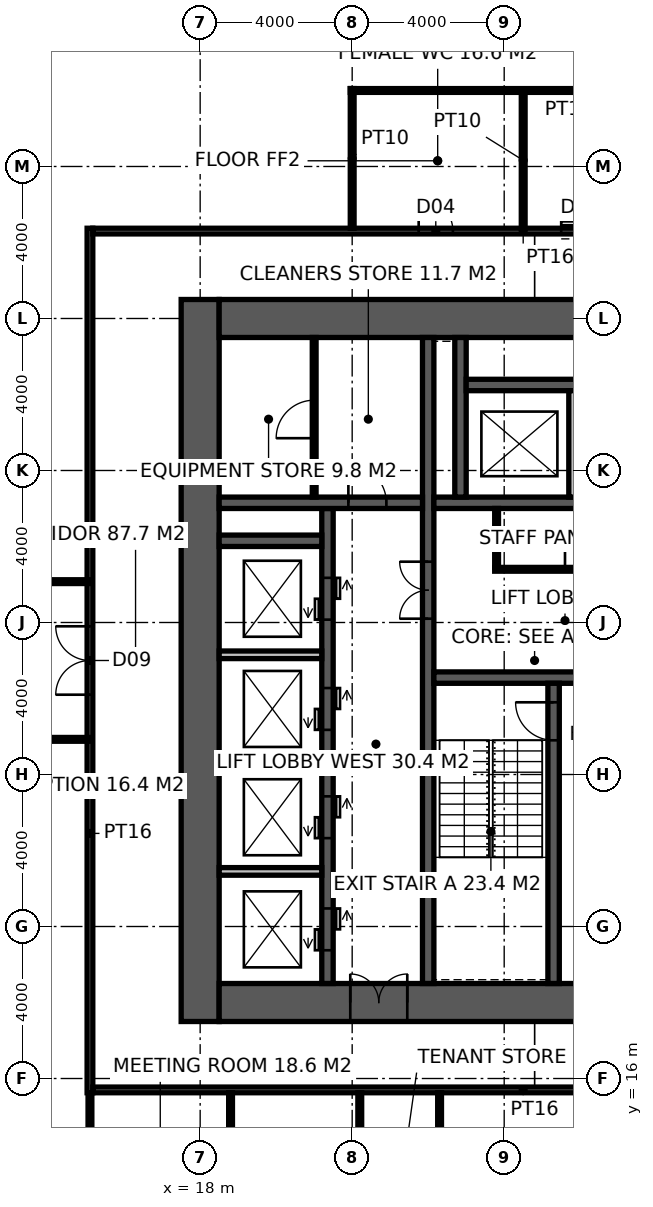
"""IFC4 building model, lengths in metres.
Left out: names, types, materials, properties, quantities, classifications, styles, units other than length and angle.
Written with IfcOpenShell. Run it as: python <this file> out.ifc"""

import sys

from ifc_helpers import new_model, si_unit, direction, frame, frame_2d, origin, place, context, subcontext, project, spatial, rectangle, extrude, element, fill, save


model = new_model("IFC4")
c1 = context("Model", 3, precision=1e-05, world=origin(), true_north=direction((0.0, 1.0)))
c2 = subcontext(c1, "Body", "Model", "MODEL_VIEW")
j1 = project(units=[si_unit("LENGTHUNIT", "METRE"), si_unit("PLANEANGLEUNIT", "RADIAN")], contexts=[c1])
p1 = place(None, origin())
s1 = spatial("IfcSite", under=j1, at=p1, CompositionType="ELEMENT")
p2 = place(p1, origin())
s2 = spatial("IfcBuilding", under=s1, at=p2, CompositionType="ELEMENT")
p3 = place(p2, frame((0.0, 0.0, 133.4)))
s3 = spatial("IfcBuildingStorey", under=s2, at=p3, CompositionType="ELEMENT", Elevation=133.4)
p4 = place(p3, frame((18.0, 17.5, -0.15), z_axis=(0.0, 0.0, 1.0), x_axis=(0.0, 1.0, 0.0)))
e1 = element("IfcWall", 1, at=p4, inside=s3, PredefinedType="SHEAR", context=c2, shape_type="SweptSolid", body=[
    extrude(rectangle(XDim=19.0, YDim=1.0, at=frame_2d((9.5, 0.0))), origin(), (0.0, 0.0, 1.0), 4.0),
])
p5 = place(p3, frame((18.5, 18.0, -0.15), z_axis=(0.0, 0.0, 1.0), x_axis=(1.0, 0.0, 0.0)))
e2 = element("IfcWall", 2, at=p5, inside=s3, PredefinedType="SHEAR", context=c2, shape_type="SweptSolid", body=[
    extrude(rectangle(XDim=17.6, YDim=1.0, at=frame_2d((8.8, 0.0))), origin(), (0.0, 0.0, 1.0), 4.0),
])
p6 = place(p5, frame((3.45, 0.0, 0.15)))
e3 = element("IfcOpeningElement", 3, at=p6, cuts=e2, PredefinedType="OPENING", context=c2, shape_type="SweptSolid", body=[
    extrude(rectangle(XDim=1.5, YDim=2.4, at=frame_2d((0.75, 1.2))), frame((0.0, 0.51, 0.0), z_axis=(0.0, -1.0, 0.0), x_axis=(1.0, 0.0, 0.0)), (0.0, 0.0, 1.0), 1.02),
])
p7 = place(p3, frame((18.5, 36.0, -0.15), z_axis=(0.0, 0.0, 1.0), x_axis=(1.0, 0.0, 0.0)))
e4 = element("IfcWall", 4, at=p7, inside=s3, PredefinedType="SHEAR", context=c2, shape_type="SweptSolid", body=[
    extrude(rectangle(XDim=17.6, YDim=1.0, at=frame_2d((8.8, 0.0))), origin(), (0.0, 0.0, 1.0), 4.0),
])
p8 = place(p3, frame((24.0, 18.5, -0.15), z_axis=(0.0, 0.0, 1.0), x_axis=(0.0, 1.0, 0.0)))
e5 = element("IfcWall", 5, at=p8, inside=s3, PredefinedType="SHEAR", context=c2, shape_type="SweptSolid", body=[
    extrude(rectangle(XDim=17.0, YDim=0.3, at=frame_2d((8.5, 0.0))), origin(), (0.0, 0.0, 1.0), 4.0),
])
p9 = place(p8, frame((9.6, 0.0, 0.15)))
e6 = element("IfcOpeningElement", 6, at=p9, cuts=e5, PredefinedType="OPENING", context=c2, shape_type="SweptSolid", body=[
    extrude(rectangle(XDim=1.5, YDim=2.4, at=frame_2d((0.75, 1.2))), frame((0.0, 0.16, 0.0), z_axis=(0.0, -1.0, 0.0), x_axis=(1.0, 0.0, 0.0)), (0.0, 0.0, 1.0), 0.32),
])
p10 = place(p3, frame((24.15, 26.55, -0.15), z_axis=(0.0, 0.0, 1.0), x_axis=(1.0, 0.0, 0.0)))
e7 = element("IfcWall", 7, at=p10, inside=s3, PredefinedType="SHEAR", context=c2, shape_type="SweptSolid", body=[
    extrude(rectangle(XDim=11.25, YDim=0.3, at=frame_2d((5.625, 0.0))), origin(), (0.0, 0.0, 1.0), 4.0),
])
p11 = place(p10, frame((9.25, 0.0, 0.15)))
e8 = element("IfcOpeningElement", 8, at=p11, cuts=e7, PredefinedType="OPENING", context=c2, shape_type="SweptSolid", body=[
    extrude(rectangle(XDim=1.0, YDim=2.2, at=frame_2d((0.5, 1.1))), frame((0.0, 0.16, 0.0), z_axis=(0.0, -1.0, 0.0), x_axis=(1.0, 0.0, 0.0)), (0.0, 0.0, 1.0), 0.32),
])
p12 = place(p10, frame((4.9, 0.0, 0.15)))
e9 = element("IfcOpeningElement", 9, at=p12, cuts=e7, PredefinedType="OPENING", context=c2, shape_type="SweptSolid", body=[
    extrude(rectangle(XDim=1.5, YDim=2.4, at=frame_2d((0.75, 1.2))), frame((0.0, 0.16, 0.0), z_axis=(0.0, -1.0, 0.0), x_axis=(1.0, 0.0, 0.0)), (0.0, 0.0, 1.0), 0.32),
])
p13 = place(p3, frame((27.3, 18.5, -0.15), z_axis=(0.0, 0.0, 1.0), x_axis=(0.0, 1.0, 0.0)))
e10 = element("IfcWall", 10, at=p13, inside=s3, PredefinedType="SHEAR", context=c2, shape_type="SweptSolid", body=[
    extrude(rectangle(XDim=7.9, YDim=0.3, at=frame_2d((3.95, 0.0))), origin(), (0.0, 0.0, 1.0), 4.0),
])
p14 = place(p13, frame((6.4, 0.0, 0.15)))
e11 = element("IfcOpeningElement", 11, at=p14, cuts=e10, PredefinedType="OPENING", context=c2, shape_type="SweptSolid", body=[
    extrude(rectangle(XDim=1.0, YDim=2.2, at=frame_2d((0.5, 1.1))), frame((0.0, 0.16, 0.0), z_axis=(0.0, -1.0, 0.0), x_axis=(1.0, 0.0, 0.0)), (0.0, 0.0, 1.0), 0.32),
])
p15 = place(p3, frame((24.15, 31.15, -0.15), z_axis=(0.0, 0.0, 1.0), x_axis=(1.0, 0.0, 0.0)))
e12 = element("IfcWall", 12, at=p15, inside=s3, PredefinedType="SHEAR", context=c2, shape_type="SweptSolid", body=[
    extrude(rectangle(XDim=11.25, YDim=0.3, at=frame_2d((5.625, 0.0))), origin(), (0.0, 0.0, 1.0), 4.0),
])
p16 = place(p15, frame((7.25, 0.0, 0.15)))
e13 = element("IfcOpeningElement", 13, at=p16, cuts=e12, PredefinedType="OPENING", context=c2, shape_type="SweptSolid", body=[
    extrude(rectangle(XDim=1.4, YDim=2.4, at=frame_2d((0.7, 1.2))), frame((0.0, 0.16, 0.0), z_axis=(0.0, -1.0, 0.0), x_axis=(1.0, 0.0, 0.0)), (0.0, 0.0, 1.0), 0.32),
])
p17 = place(p3, frame((21.35, 18.5, -0.15), z_axis=(0.0, 0.0, 1.0), x_axis=(0.0, 1.0, 0.0)))
e14 = element("IfcWall", 14, at=p17, inside=s3, PredefinedType="SHEAR", context=c2, shape_type="SweptSolid", body=[
    extrude(rectangle(XDim=12.5, YDim=0.3, at=frame_2d((6.25, 0.0))), origin(), (0.0, 0.0, 1.0), 4.0),
])
p18 = place(p17, frame((0.875, 0.0, 0.15)))
e15 = element("IfcOpeningElement", 15, at=p18, cuts=e14, PredefinedType="OPENING", context=c2, shape_type="SweptSolid", body=[
    extrude(rectangle(XDim=1.1, YDim=2.2, at=frame_2d((0.55, 1.1))), frame((0.0, 0.16, 0.0), z_axis=(0.0, -1.0, 0.0), x_axis=(1.0, 0.0, 0.0)), (0.0, 0.0, 1.0), 0.32),
])
p19 = place(p17, frame((3.825, 0.0, 0.15)))
e16 = element("IfcOpeningElement", 16, at=p19, cuts=e14, PredefinedType="OPENING", context=c2, shape_type="SweptSolid", body=[
    extrude(rectangle(XDim=1.1, YDim=2.2, at=frame_2d((0.55, 1.1))), frame((0.0, 0.16, 0.0), z_axis=(0.0, -1.0, 0.0), x_axis=(1.0, 0.0, 0.0)), (0.0, 0.0, 1.0), 0.32),
])
p20 = place(p17, frame((6.675, 0.0, 0.15)))
e17 = element("IfcOpeningElement", 17, at=p20, cuts=e14, PredefinedType="OPENING", context=c2, shape_type="SweptSolid", body=[
    extrude(rectangle(XDim=1.1, YDim=2.2, at=frame_2d((0.55, 1.1))), frame((0.0, 0.16, 0.0), z_axis=(0.0, -1.0, 0.0), x_axis=(1.0, 0.0, 0.0)), (0.0, 0.0, 1.0), 0.32),
])
p21 = place(p17, frame((9.575, 0.0, 0.15)))
e18 = element("IfcOpeningElement", 18, at=p21, cuts=e14, PredefinedType="OPENING", context=c2, shape_type="SweptSolid", body=[
    extrude(rectangle(XDim=1.1, YDim=2.2, at=frame_2d((0.55, 1.1))), frame((0.0, 0.16, 0.0), z_axis=(0.0, -1.0, 0.0), x_axis=(1.0, 0.0, 0.0)), (0.0, 0.0, 1.0), 0.32),
])
p22 = place(p3, frame((18.5, 31.15, -0.15), z_axis=(0.0, 0.0, 1.0), x_axis=(1.0, 0.0, 0.0)))
e19 = element("IfcWall", 19, at=p22, inside=s3, PredefinedType="SHEAR", context=c2, shape_type="SweptSolid", body=[
    extrude(rectangle(XDim=5.35, YDim=0.3, at=frame_2d((2.675, 0.0))), origin(), (0.0, 0.0, 1.0), 4.0),
])
p23 = place(p22, frame((3.4, 0.0, 0.15)))
e20 = element("IfcOpeningElement", 20, at=p23, cuts=e19, PredefinedType="OPENING", context=c2, shape_type="SweptSolid", body=[
    extrude(rectangle(XDim=1.0, YDim=2.2, at=frame_2d((0.5, 1.1))), frame((0.0, 0.16, 0.0), z_axis=(0.0, -1.0, 0.0), x_axis=(1.0, 0.0, 0.0)), (0.0, 0.0, 1.0), 0.32),
])
p24 = place(p3, frame((18.5, 30.15, -0.15), z_axis=(0.0, 0.0, 1.0), x_axis=(1.0, 0.0, 0.0)))
e21 = element("IfcWall", 21, at=p24, inside=s3, PredefinedType="SHEAR", context=c2, shape_type="SweptSolid", body=[
    extrude(rectangle(XDim=2.7, YDim=0.3, at=frame_2d((1.35, 0.0))), origin(), (0.0, 0.0, 1.0), 4.0),
])
p25 = place(p3, frame((24.85, 31.3, -0.15), z_axis=(0.0, 0.0, 1.0), x_axis=(0.0, 1.0, 0.0)))
e22 = element("IfcWall", 22, at=p25, inside=s3, PredefinedType="SHEAR", context=c2, shape_type="SweptSolid", body=[
    extrude(rectangle(XDim=4.2, YDim=0.3, at=frame_2d((2.1, 0.0))), origin(), (0.0, 0.0, 1.0), 4.0),
])
p26 = place(p3, frame((25.0, 34.25, -0.15), z_axis=(0.0, 0.0, 1.0), x_axis=(1.0, 0.0, 0.0)))
e23 = element("IfcWall", 23, at=p26, inside=s3, PredefinedType="SHEAR", context=c2, shape_type="SweptSolid", body=[
    extrude(rectangle(XDim=8.6, YDim=0.3, at=frame_2d((4.3, 0.0))), origin(), (0.0, 0.0, 1.0), 4.0),
])
p27 = place(p3, frame((27.8, 31.3, -0.15), z_axis=(0.0, 0.0, 1.0), x_axis=(0.0, 1.0, 0.0)))
e24 = element("IfcWall", 24, at=p27, inside=s3, PredefinedType="SOLIDWALL", context=c2, shape_type="SweptSolid", body=[
    extrude(rectangle(XDim=2.8, YDim=0.2, at=frame_2d((1.4, 0.0))), origin(), (0.0, 0.0, 1.0), 4.0),
])
for number, where, z_axis, x_axis in (
    (25, (18.5, 21.45, -0.15), (0.0, 0.0, 1.0), (1.0, 0.0, 0.0)),
    (26, (18.5, 24.3, -0.15), (0.0, 0.0, 1.0), (1.0, 0.0, 0.0)),
    (27, (18.5, 27.15, -0.15), (0.0, 0.0, 1.0), (1.0, 0.0, 0.0)),
):
    element("IfcWall", number, at=place(p3, frame(where, z_axis=z_axis, x_axis=x_axis)), inside=s3, PredefinedType="SOLIDWALL", context=c2, shape_type="SweptSolid", body=[
        extrude(rectangle(XDim=2.7, YDim=0.2, at=frame_2d((1.35, 0.0))), origin(), (0.0, 0.0, 1.0), 4.0),
    ])
p28 = place(p3, frame((21.0, 31.3, 0.0), z_axis=(0.0, 0.0, 1.0), x_axis=(0.0, 1.0, 0.0)))
e28 = element("IfcWall", 28, at=p28, inside=s3, PredefinedType="PARTITIONING", context=c2, shape_type="SweptSolid", body=[
    extrude(rectangle(XDim=4.2, YDim=0.1, at=frame_2d((2.1, 0.0))), origin(), (0.0, 0.0, 1.0), 3.85),
])
p29 = place(p28, frame((1.55, 0.0, 0.0)))
e29 = element("IfcOpeningElement", 29, at=p29, cuts=e28, PredefinedType="OPENING", context=c2, shape_type="SweptSolid", body=[
    extrude(rectangle(XDim=1.0, YDim=2.2, at=frame_2d((0.5, 1.1))), frame((0.0, 0.06, 0.0), z_axis=(0.0, -1.0, 0.0), x_axis=(1.0, 0.0, 0.0)), (0.0, 0.0, 1.0), 0.12),
])
p30 = place(p3, frame((25.75, 29.4, 0.0), z_axis=(0.0, 0.0, 1.0), x_axis=(1.0, 0.0, 0.0)))
e30 = element("IfcWall", 30, at=p30, inside=s3, PredefinedType="PARTITIONING", context=c2, shape_type="SweptSolid", body=[
    extrude(rectangle(XDim=4.7, YDim=0.1, at=frame_2d((2.35, 0.0))), origin(), (0.0, 0.0, 1.0), 3.85),
])
p31 = place(p30, frame((1.85, 0.0, 0.0)))
e31 = element("IfcOpeningElement", 31, at=p31, cuts=e30, PredefinedType="OPENING", context=c2, shape_type="SweptSolid", body=[
    extrude(rectangle(XDim=1.0, YDim=2.2, at=frame_2d((0.5, 1.1))), frame((0.0, 0.06, 0.0), z_axis=(0.0, -1.0, 0.0), x_axis=(1.0, 0.0, 0.0)), (0.0, 0.0, 1.0), 0.12),
])
p32 = place(p3, frame((25.8, 29.45, 0.0), z_axis=(0.0, 0.0, 1.0), x_axis=(0.0, 1.0, 0.0)))
e32 = element("IfcWall", 32, at=p32, inside=s3, PredefinedType="PARTITIONING", context=c2, shape_type="SweptSolid", body=[
    extrude(rectangle(XDim=1.55, YDim=0.1, at=frame_2d((0.775, 0.0))), origin(), (0.0, 0.0, 1.0), 3.85),
])
p33 = place(p3, frame((15.1, 15.625, 0.0), z_axis=(0.0, 0.0, 1.0), x_axis=(0.0, 1.0, 0.0)))
e33 = element("IfcWall", 33, at=p33, inside=s3, PredefinedType="PARTITIONING", context=c2, shape_type="SweptSolid", body=[
    extrude(rectangle(XDim=22.75, YDim=0.15, at=frame_2d((11.375, 0.0))), origin(), (0.0, 0.0, 1.0), 3.85),
])
p34 = place(p33, frame((10.475, 0.0, 0.0)))
e34 = element("IfcOpeningElement", 34, at=p34, cuts=e33, PredefinedType="OPENING", context=c2, shape_type="SweptSolid", body=[
    extrude(rectangle(XDim=1.8, YDim=2.4, at=frame_2d((0.9, 1.2))), frame((0.0, 0.085, 0.0), z_axis=(0.0, -1.0, 0.0), x_axis=(1.0, 0.0, 0.0)), (0.0, 0.0, 1.0), 0.17),
])
p35 = place(p3, frame((15.175, 15.7, 0.0), z_axis=(0.0, 0.0, 1.0), x_axis=(1.0, 0.0, 0.0)))
e35 = element("IfcWall", 35, at=p35, inside=s3, PredefinedType="PARTITIONING", context=c2, shape_type="SweptSolid", body=[
    extrude(rectangle(XDim=22.65, YDim=0.15, at=frame_2d((11.325, 0.0))), origin(), (0.0, 0.0, 1.0), 3.85),
])
p36 = place(p3, frame((15.175, 38.3, 0.0), z_axis=(0.0, 0.0, 1.0), x_axis=(1.0, 0.0, 0.0)))
e36 = element("IfcWall", 36, at=p36, inside=s3, PredefinedType="PARTITIONING", context=c2, shape_type="SweptSolid", body=[
    extrude(rectangle(XDim=22.65, YDim=0.15, at=frame_2d((11.325, 0.0))), origin(), (0.0, 0.0, 1.0), 3.85),
])
p37 = place(p36, frame((8.575, 0.0, 0.0)))
e37 = element("IfcOpeningElement", 37, at=p37, cuts=e36, PredefinedType="OPENING", context=c2, shape_type="SweptSolid", body=[
    extrude(rectangle(XDim=0.9, YDim=2.1, at=frame_2d((0.45, 1.05))), frame((0.0, 0.085, 0.0), z_axis=(0.0, -1.0, 0.0), x_axis=(1.0, 0.0, 0.0)), (0.0, 0.0, 1.0), 0.17),
])
p38 = place(p36, frame((12.325, 0.0, 0.0)))
e38 = element("IfcOpeningElement", 38, at=p38, cuts=e36, PredefinedType="OPENING", context=c2, shape_type="SweptSolid", body=[
    extrude(rectangle(XDim=1.0, YDim=2.1, at=frame_2d((0.5, 1.05))), frame((0.0, 0.085, 0.0), z_axis=(0.0, -1.0, 0.0), x_axis=(1.0, 0.0, 0.0)), (0.0, 0.0, 1.0), 0.17),
])
p39 = place(p36, frame((16.175, 0.0, 0.0)))
e39 = element("IfcOpeningElement", 39, at=p39, cuts=e36, PredefinedType="OPENING", context=c2, shape_type="SweptSolid", body=[
    extrude(rectangle(XDim=0.9, YDim=2.1, at=frame_2d((0.45, 1.05))), frame((0.0, 0.085, 0.0), z_axis=(0.0, -1.0, 0.0), x_axis=(1.0, 0.0, 0.0)), (0.0, 0.0, 1.0), 0.17),
])
p40 = place(p3, frame((22.0, 38.375, 0.0), z_axis=(0.0, 0.0, 1.0), x_axis=(0.0, 1.0, 0.0)))
e40 = element("IfcWall", 40, at=p40, inside=s3, PredefinedType="PARTITIONING", context=c2, shape_type="SweptSolid", body=[
    extrude(rectangle(XDim=3.675, YDim=0.1, at=frame_2d((1.837, 0.0))), origin(), (0.0, 0.0, 1.0), 2.95),
])
p41 = place(p3, frame((21.95, 42.0, 0.0), z_axis=(0.0, 0.0, 1.0), x_axis=(1.0, 0.0, 0.0)))
e41 = element("IfcWall", 41, at=p41, inside=s3, PredefinedType="PARTITIONING", context=c2, shape_type="SweptSolid", body=[
    extrude(rectangle(XDim=12.1, YDim=0.1, at=frame_2d((6.05, 0.0))), origin(), (0.0, 0.0, 1.0), 3.85),
])
p42 = place(p3, frame((26.5, 38.375, 0.0), z_axis=(0.0, 0.0, 1.0), x_axis=(0.0, 1.0, 0.0)))
e42 = element("IfcWall", 42, at=p42, inside=s3, PredefinedType="PARTITIONING", context=c2, shape_type="SweptSolid", body=[
    extrude(rectangle(XDim=3.575, YDim=0.1, at=frame_2d((1.788, 0.0))), origin(), (0.0, 0.0, 1.0), 2.65),
])
for number, where, z_axis, x_axis in (
    (43, (15.1, 10.35, 0.0), (0.0, 0.0, 1.0), (0.0, 1.0, 0.0)),
    (44, (18.8, 10.35, 0.0), (0.0, 0.0, 1.0), (0.0, 1.0, 0.0)),
    (45, (22.2, 10.35, 0.0), (0.0, 0.0, 1.0), (0.0, 1.0, 0.0)),
    (46, (24.3, 10.35, 0.0), (0.0, 0.0, 1.0), (0.0, 1.0, 0.0)),
):
    element("IfcWall", number, at=place(p3, frame(where, z_axis=z_axis, x_axis=x_axis)), inside=s3, PredefinedType="PARTITIONING", context=c2, shape_type="SweptSolid", body=[
        extrude(rectangle(XDim=5.275, YDim=0.1, at=frame_2d((2.637, 0.0))), origin(), (0.0, 0.0, 1.0), 3.85),
    ])
for number, where, z_axis, x_axis in (
    (47, (15.1, 29.075, 0.0), (0.0, 0.0, 1.0), (-1.0, 0.0, 0.0)),
    (48, (11.15, 24.925, 0.0), (0.0, 0.0, 1.0), (1.0, 0.0, 0.0)),
):
    element("IfcWall", number, at=place(p3, frame(where, z_axis=z_axis, x_axis=x_axis)), inside=s3, PredefinedType="PARTITIONING", context=c2, shape_type="SweptSolid", body=[
        extrude(rectangle(XDim=3.95, YDim=0.1, at=frame_2d((1.975, 0.0))), origin(), (0.0, 0.0, 1.0), 3.85),
    ])
p43 = place(p14, origin())
e49 = element("IfcDoor", 49, at=p43, inside=s3, OperationType="SINGLE_SWING_RIGHT", PredefinedType="DOOR", context=c2, shape_type="SweptSolid", body=[
    extrude(rectangle(XDim=1.0, YDim=2.2, at=frame_2d((0.5, 1.1))), frame((0.0, 0.025, 0.0), z_axis=(0.0, -1.0, 0.0), x_axis=(1.0, 0.0, 0.0)), (0.0, 0.0, 1.0), 0.05),
])
fill(e11, e49)
p44 = place(p9, origin())
e50 = element("IfcDoor", 50, at=p44, inside=s3, OperationType="DOUBLE_DOOR_DOUBLE_SWING", PredefinedType="DOOR", context=c2, shape_type="SweptSolid", body=[
    extrude(rectangle(XDim=1.5, YDim=2.4, at=frame_2d((0.75, 1.2))), frame((0.0, 0.025, 0.0), z_axis=(0.0, -1.0, 0.0), x_axis=(1.0, 0.0, 0.0)), (0.0, 0.0, 1.0), 0.05),
])
fill(e6, e50)
p45 = place(p23, origin())
e51 = element("IfcDoor", 51, at=p45, inside=s3, OperationType="SINGLE_SWING_LEFT", PredefinedType="DOOR", context=c2, shape_type="SweptSolid", body=[
    extrude(rectangle(XDim=1.0, YDim=2.2, at=frame_2d((0.5, 1.1))), frame((0.0, 0.025, 0.0), z_axis=(0.0, -1.0, 0.0), x_axis=(1.0, 0.0, 0.0)), (0.0, 0.0, 1.0), 0.05),
])
fill(e20, e51)
p46 = place(p29, origin())
e52 = element("IfcDoor", 52, at=p46, inside=s3, OperationType="SINGLE_SWING_LEFT", PredefinedType="DOOR", context=c2, shape_type="SweptSolid", body=[
    extrude(rectangle(XDim=1.0, YDim=2.2, at=frame_2d((0.5, 1.1))), frame((0.0, 0.025, 0.0), z_axis=(0.0, -1.0, 0.0), x_axis=(1.0, 0.0, 0.0)), (0.0, 0.0, 1.0), 0.05),
])
fill(e29, e52)
p47 = place(p31, origin())
e53 = element("IfcDoor", 53, at=p47, inside=s3, OperationType="SINGLE_SWING_LEFT", PredefinedType="DOOR", context=c2, shape_type="SweptSolid", body=[
    extrude(rectangle(XDim=1.0, YDim=2.2, at=frame_2d((0.5, 1.1))), frame((0.0, 0.025, 0.0), z_axis=(0.0, -1.0, 0.0), x_axis=(1.0, 0.0, 0.0)), (0.0, 0.0, 1.0), 0.05),
])
fill(e31, e53)
p48 = place(p6, origin())
e54 = element("IfcDoor", 54, at=p48, inside=s3, OperationType="DOUBLE_DOOR_DOUBLE_SWING", PredefinedType="DOOR", context=c2, shape_type="SweptSolid", body=[
    extrude(rectangle(XDim=1.5, YDim=2.4, at=frame_2d((0.75, 1.2))), frame((0.0, 0.025, 0.0), z_axis=(0.0, -1.0, 0.0), x_axis=(1.0, 0.0, 0.0)), (0.0, 0.0, 1.0), 0.05),
])
fill(e3, e54)
p49 = place(p37, origin())
e55 = element("IfcDoor", 55, at=p49, inside=s3, OperationType="SINGLE_SWING_LEFT", PredefinedType="DOOR", context=c2, shape_type="SweptSolid", body=[
    extrude(rectangle(XDim=0.9, YDim=2.1, at=frame_2d((0.45, 1.05))), frame((0.0, 0.025, 0.0), z_axis=(0.0, -1.0, 0.0), x_axis=(1.0, 0.0, 0.0)), (0.0, 0.0, 1.0), 0.05),
])
fill(e37, e55)
p50 = place(p38, origin())
e56 = element("IfcDoor", 56, at=p50, inside=s3, OperationType="SLIDING_TO_LEFT", PredefinedType="DOOR", context=c2, shape_type="SweptSolid", body=[
    extrude(rectangle(XDim=1.0, YDim=2.1, at=frame_2d((0.5, 1.05))), frame((0.0, 0.025, 0.0), z_axis=(0.0, -1.0, 0.0), x_axis=(1.0, 0.0, 0.0)), (0.0, 0.0, 1.0), 0.05),
])
fill(e38, e56)
p51 = place(p34, origin())
e57 = element("IfcDoor", 57, at=p51, inside=s3, OperationType="DOUBLE_DOOR_DOUBLE_SWING", PredefinedType="DOOR", context=c2, shape_type="SweptSolid", body=[
    extrude(rectangle(XDim=1.8, YDim=2.4, at=frame_2d((0.9, 1.2))), frame((0.0, 0.025, 0.0), z_axis=(0.0, -1.0, 0.0), x_axis=(1.0, 0.0, 0.0)), (0.0, 0.0, 1.0), 0.05),
])
fill(e34, e57)
p52 = place(p18, origin())
e58 = element("IfcDoor", 58, at=p52, inside=s3, OperationType="DOUBLE_DOOR_SLIDING", PredefinedType="DOOR", context=c2, shape_type="SweptSolid", body=[
    extrude(rectangle(XDim=1.1, YDim=2.2, at=frame_2d((0.55, 1.1))), frame((0.0, 0.025, 0.0), z_axis=(0.0, -1.0, 0.0), x_axis=(1.0, 0.0, 0.0)), (0.0, 0.0, 1.0), 0.05),
])
fill(e15, e58)
p53 = place(p19, origin())
e59 = element("IfcDoor", 59, at=p53, inside=s3, OperationType="DOUBLE_DOOR_SLIDING", PredefinedType="DOOR", context=c2, shape_type="SweptSolid", body=[
    extrude(rectangle(XDim=1.1, YDim=2.2, at=frame_2d((0.55, 1.1))), frame((0.0, 0.025, 0.0), z_axis=(0.0, -1.0, 0.0), x_axis=(1.0, 0.0, 0.0)), (0.0, 0.0, 1.0), 0.05),
])
fill(e16, e59)
p54 = place(p20, origin())
e60 = element("IfcDoor", 60, at=p54, inside=s3, OperationType="DOUBLE_DOOR_SLIDING", PredefinedType="DOOR", context=c2, shape_type="SweptSolid", body=[
    extrude(rectangle(XDim=1.1, YDim=2.2, at=frame_2d((0.55, 1.1))), frame((0.0, 0.025, 0.0), z_axis=(0.0, -1.0, 0.0), x_axis=(1.0, 0.0, 0.0)), (0.0, 0.0, 1.0), 0.05),
])
fill(e17, e60)
p55 = place(p21, origin())
e61 = element("IfcDoor", 61, at=p55, inside=s3, OperationType="DOUBLE_DOOR_SLIDING", PredefinedType="DOOR", context=c2, shape_type="SweptSolid", body=[
    extrude(rectangle(XDim=1.1, YDim=2.2, at=frame_2d((0.55, 1.1))), frame((0.0, 0.025, 0.0), z_axis=(0.0, -1.0, 0.0), x_axis=(1.0, 0.0, 0.0)), (0.0, 0.0, 1.0), 0.05),
])
fill(e18, e61)
save(model, sys.argv[1])
